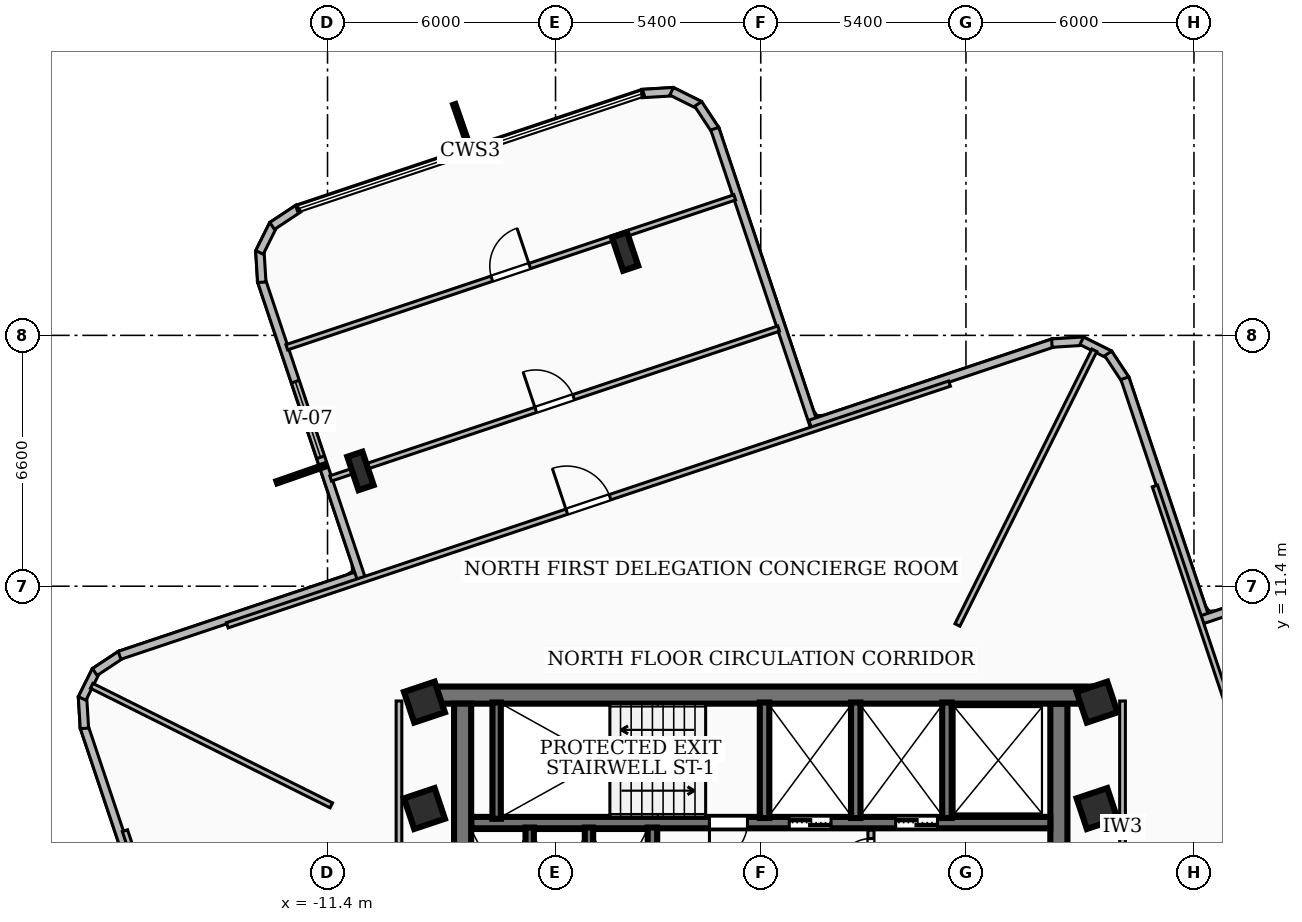
"""IFC4 building model, lengths in metres.
Left out: names, types, materials, properties, quantities, classifications, styles, units other than length and angle.
Written with IfcOpenShell. Run it as: python <this file> out.ifc"""

import sys

from ifc_helpers import new_model, si_unit, direction, frame, frame_2d, origin, origin_2d, place, context, subcontext, project, spatial, rectangle, i_section, extrude, element, fill, save


model = new_model("IFC4")
c1 = context("Model", 3, precision=1e-05, world=origin(), true_north=direction((0.0, 1.0)))
c2 = subcontext(c1, "Body", "Model", "MODEL_VIEW")
j1 = project(units=[si_unit("LENGTHUNIT", "METRE"), si_unit("PLANEANGLEUNIT", "RADIAN")], contexts=[c1])
p1 = place(None, origin())
s1 = spatial("IfcSite", under=j1, at=p1, CompositionType="ELEMENT")
p2 = place(p1, origin())
s2 = spatial("IfcBuilding", under=s1, at=p2, CompositionType="ELEMENT")
p3 = place(p2, frame((0.0, 0.0, 163.08)))
s3 = spatial("IfcBuildingStorey", under=s2, at=p3, CompositionType="ELEMENT", Elevation=163.08)
p4 = place(p3, frame((-8.78, 8.535, 0.0), z_axis=(0.0, 0.0, 1.0), x_axis=(1.0, 0.0, 0.0)))
e1 = element("IfcWall", 1, at=p4, inside=s3, PredefinedType="SHEAR", context=c2, shape_type="SweptSolid", body=[
    extrude(rectangle(XDim=17.56, YDim=0.45, at=frame_2d((8.78, 0.0))), origin(), (0.0, 0.0, 1.0), 3.34),
])
for number, where, z_axis, x_axis in (
    (2, (-7.845, 1.975, 0.0), (0.0, 0.0, 1.0), (0.0, 1.0, 0.0)),
    (3, (7.845, 8.31, 0.0), (0.0, 0.0, 1.0), (0.0, -1.0, 0.0)),
):
    element("IfcWall", number, at=place(p3, frame(where, z_axis=z_axis, x_axis=x_axis)), inside=s3, PredefinedType="SHEAR", context=c2, shape_type="SweptSolid", body=[
        extrude(rectangle(XDim=6.335, YDim=0.45, at=frame_2d((3.167, 0.0))), origin(), (0.0, 0.0, 1.0), 3.34),
    ])
p5 = place(p3, frame((7.62, 5.18, 0.0), z_axis=(0.0, 0.0, 1.0), x_axis=(-1.0, 0.0, 0.0)))
e4 = element("IfcWall", 4, at=p5, inside=s3, PredefinedType="SOLIDWALL", context=c2, shape_type="SweptSolid", body=[
    extrude(rectangle(XDim=15.24, YDim=0.3, at=frame_2d((7.62, 0.0))), origin(), (0.0, 0.0, 1.0), 3.34),
])
p6 = place(p5, frame((5.77, 0.0, 0.0)))
e5 = element("IfcOpeningElement", 5, at=p6, cuts=e4, PredefinedType="OPENING", context=c2, shape_type="SweptSolid", body=[
    extrude(rectangle(XDim=1.1, YDim=2.15, at=frame_2d((0.55, 1.075))), frame((0.0, 0.16, 0.0), z_axis=(0.0, -1.0, 0.0), x_axis=(1.0, 0.0, 0.0)), (0.0, 0.0, 1.0), 0.32),
])
p7 = place(p5, frame((2.97, 0.0, 0.0)))
e6 = element("IfcOpeningElement", 6, at=p7, cuts=e4, PredefinedType="OPENING", context=c2, shape_type="SweptSolid", body=[
    extrude(rectangle(XDim=1.1, YDim=2.15, at=frame_2d((0.55, 1.075))), frame((0.0, 0.16, 0.0), z_axis=(0.0, -1.0, 0.0), x_axis=(1.0, 0.0, 0.0)), (0.0, 0.0, 1.0), 0.32),
])
p8 = place(p5, frame((7.97, 0.0, 0.0)))
e7 = element("IfcOpeningElement", 7, at=p8, cuts=e4, PredefinedType="OPENING", context=c2, shape_type="SweptSolid", body=[
    extrude(rectangle(XDim=1.0, YDim=2.1, at=frame_2d((0.5, 1.05))), frame((0.0, 0.16, 0.0), z_axis=(0.0, -1.0, 0.0), x_axis=(1.0, 0.0, 0.0)), (0.0, 0.0, 1.0), 0.32),
])
p9 = place(p3, frame((-6.95, 5.28, 0.0), z_axis=(0.0, 0.0, 1.0), x_axis=(0.0, 1.0, 0.0)))
e8 = element("IfcWall", 8, at=p9, inside=s3, PredefinedType="SOLIDWALL", context=c2, shape_type="SweptSolid", body=[
    extrude(rectangle(XDim=3.06, YDim=0.22, at=frame_2d((1.53, 0.0))), origin(), (0.0, 0.0, 1.0), 3.34),
])
for number, where, z_axis, x_axis in (
    (9, (0.1, 5.3, 0.0), (0.0, 0.0, 1.0), (0.0, 1.0, 0.0)),
    (10, (2.5, 5.3, 0.0), (0.0, 0.0, 1.0), (0.0, 1.0, 0.0)),
    (11, (4.9, 5.3, 0.0), (0.0, 0.0, 1.0), (0.0, 1.0, 0.0)),
):
    element("IfcWall", number, at=place(p3, frame(where, z_axis=z_axis, x_axis=x_axis)), inside=s3, PredefinedType="SOLIDWALL", context=c2, shape_type="SweptSolid", body=[
        extrude(rectangle(XDim=3.04, YDim=0.25, at=frame_2d((1.52, 0.0))), origin(), (0.0, 0.0, 1.0), 3.34),
    ])
p10 = place(p3, frame((-2.85, 1.98, 0.0), z_axis=(0.0, 0.0, 1.0), x_axis=(0.0, 1.0, 0.0)))
e12 = element("IfcWall", 12, at=p10, inside=s3, PredefinedType="SOLIDWALL", context=c2, shape_type="SweptSolid", body=[
    extrude(rectangle(XDim=3.07, YDim=0.25, at=frame_2d((1.535, 0.0))), origin(), (0.0, 0.0, 1.0), 3.34),
])
for number, where, z_axis, x_axis in (
    (13, (-6.08, 1.98, 0.0), (0.0, 0.0, 1.0), (0.0, 1.0, 0.0)),
    (14, (-4.52, 1.98, 0.0), (0.0, 0.0, 1.0), (0.0, 1.0, 0.0)),
):
    element("IfcWall", number, at=place(p3, frame(where, z_axis=z_axis, x_axis=x_axis)), inside=s3, PredefinedType="SOLIDWALL", context=c2, shape_type="SweptSolid", body=[
        extrude(rectangle(XDim=3.07, YDim=0.22, at=frame_2d((1.535, 0.0))), origin(), (0.0, 0.0, 1.0), 3.34),
    ])
for number, where, z_axis, x_axis in (
    (15, (-8.85, 5.55, 0.0), (0.0, 0.0, 1.0), (0.948, 0.317, 0.0)),
    (16, (8.85, 5.55, 0.0), (0.0, 0.0, 1.0), (0.948, 0.317, 0.0)),
    (17, (-8.85, 8.35, 0.0), (0.0, 0.0, 1.0), (0.948, 0.317, 0.0)),
    (18, (8.85, 8.35, 0.0), (0.0, 0.0, 1.0), (0.948, 0.317, 0.0)),
):
    element("IfcColumn", number, at=place(p3, frame(where, z_axis=z_axis, x_axis=x_axis)), inside=s3, PredefinedType="COLUMN", context=c2, shape_type="SweptSolid", body=[
        extrude(rectangle(XDim=0.85, YDim=0.85, at=origin_2d()), origin(), (0.0, 0.0, 1.0), 3.6),
    ])
for number, where, z_axis, x_axis in (
    (19, (-3.57, 20.207, 0.0), (0.0, 0.0, 1.0), (0.948, 0.317, 0.0)),
    (20, (-10.533, 14.433, 0.0), (0.0, 0.0, 1.0), (0.948, 0.317, 0.0)),
):
    element("IfcColumn", number, at=place(p3, frame(where, z_axis=z_axis, x_axis=x_axis)), inside=s3, PredefinedType="COLUMN", context=c2, shape_type="SweptSolid", body=[
        extrude(i_section(OverallWidth=0.418, OverallDepth=0.927, WebThickness=0.019, FlangeThickness=0.032, at=origin_2d()), origin(), (0.0, 0.0, 1.0), 3.6),
    ])
p11 = place(p3, frame((-15.662, 1.3, 0.0), z_axis=(0.0, 0.0, 1.0), x_axis=(-0.317224676093, 0.948350412494, 0.0)))
e21 = element("IfcWall", 21, at=p11, inside=s3, PredefinedType="SOLIDWALL", context=c2, shape_type="SweptSolid", body=[
    extrude(rectangle(XDim=6.758, YDim=0.22, at=frame_2d((3.379, 0.0))), origin(), (0.0, 0.0, 1.0), 3.34),
])
p12 = place(p3, frame((-17.796, 7.66, 0.0), z_axis=(0.0, 0.0, 1.0), x_axis=(-0.062305442082, 0.998057128569, 0.0)))
e22 = element("IfcWall", 22, at=p12, inside=s3, PredefinedType="SOLIDWALL", context=c2, shape_type="SweptSolid", body=[
    extrude(rectangle(XDim=0.835, YDim=0.22, at=frame_2d((0.417, 0.0))), origin(), (0.0, 0.0, 1.0), 3.34),
])
p13 = place(p3, frame((-17.857, 8.446, 0.0), z_axis=(0.0, 0.0, 1.0), x_axis=(0.446258139106, 0.894904281631, 0.0)))
e23 = element("IfcWall", 23, at=p13, inside=s3, PredefinedType="SOLIDWALL", context=c2, shape_type="SweptSolid", body=[
    extrude(rectangle(XDim=0.818, YDim=0.22, at=frame_2d((0.409, 0.0))), origin(), (0.0, 0.0, 1.0), 3.34),
])
p14 = place(p3, frame((-17.524, 9.142, 0.0), z_axis=(0.0, 0.0, 1.0), x_axis=(0.833756011094, 0.552133058206, 0.0)))
e24 = element("IfcWall", 24, at=p14, inside=s3, PredefinedType="SOLIDWALL", context=c2, shape_type="SweptSolid", body=[
    extrude(rectangle(XDim=0.835, YDim=0.22, at=frame_2d((0.417, 0.0))), origin(), (0.0, 0.0, 1.0), 3.34),
])
p15 = place(p3, frame((-16.873, 9.581, 0.0), z_axis=(0.0, 0.0, 1.0), x_axis=(0.94829606055, 0.317387116224, 0.0)))
e25 = element("IfcWall", 25, at=p15, inside=s3, PredefinedType="SOLIDWALL", context=c2, shape_type="SweptSolid", body=[
    extrude(rectangle(XDim=6.758, YDim=0.22, at=frame_2d((3.379, 0.0))), origin(), (0.0, 0.0, 1.0), 3.34),
])
p16 = place(p3, frame((-10.519, 11.615, 0.0), z_axis=(0.0, 0.0, 1.0), x_axis=(-0.317229741122, 0.948348718219, 0.0)))
e26 = element("IfcWall", 26, at=p16, inside=s3, PredefinedType="SOLIDWALL", context=c2, shape_type="SweptSolid", body=[
    extrude(rectangle(XDim=8.259, YDim=0.22, at=frame_2d((4.129, 0.0))), origin(), (0.0, 0.0, 1.0), 3.34),
])
p17 = place(p16, frame((3.35, 0.0, 0.85)))
e27 = element("IfcOpeningElement", 27, at=p17, cuts=e26, PredefinedType="OPENING", context=c2, shape_type="SweptSolid", body=[
    extrude(rectangle(XDim=2.1, YDim=1.8, at=frame_2d((1.05, 0.9))), frame((0.0, 0.12, 0.0), z_axis=(0.0, -1.0, 0.0), x_axis=(1.0, 0.0, 0.0)), (0.0, 0.0, 1.0), 0.24),
])
p18 = place(p3, frame((-13.129, 19.398, 0.0), z_axis=(0.0, 0.0, 1.0), x_axis=(-0.062378286155, 0.998052578483, 0.0)))
e28 = element("IfcWall", 28, at=p18, inside=s3, PredefinedType="SOLIDWALL", context=c2, shape_type="SweptSolid", body=[
    extrude(rectangle(XDim=0.834, YDim=0.22, at=frame_2d((0.417, 0.0))), origin(), (0.0, 0.0, 1.0), 3.34),
])
p19 = place(p3, frame((-13.19, 20.183, 0.0), z_axis=(0.0, 0.0, 1.0), x_axis=(0.445781750405, 0.895141682085, 0.0)))
e29 = element("IfcWall", 29, at=p19, inside=s3, PredefinedType="SOLIDWALL", context=c2, shape_type="SweptSolid", body=[
    extrude(rectangle(XDim=0.819, YDim=0.22, at=frame_2d((0.409, 0.0))), origin(), (0.0, 0.0, 1.0), 3.34),
])
p20 = place(p3, frame((-12.857, 20.88, 0.0), z_axis=(0.0, 0.0, 1.0), x_axis=(0.833621383437, 0.552336300706, 0.0)))
e30 = element("IfcWall", 30, at=p20, inside=s3, PredefinedType="SOLIDWALL", context=c2, shape_type="SweptSolid", body=[
    extrude(rectangle(XDim=0.835, YDim=0.22, at=frame_2d((0.417, 0.0))), origin(), (0.0, 0.0, 1.0), 3.34),
])
p21 = place(p3, frame((-3.131, 24.363, 0.0), z_axis=(0.0, 0.0, 1.0), x_axis=(0.998269325078, 0.05880777677, 0.0)))
e31 = element("IfcWall", 31, at=p21, inside=s3, PredefinedType="SOLIDWALL", context=c2, shape_type="SweptSolid", body=[
    extrude(rectangle(XDim=0.834, YDim=0.22, at=frame_2d((0.417, 0.0))), origin(), (0.0, 0.0, 1.0), 3.34),
])
p22 = place(p3, frame((-2.345, 24.422, 0.0), z_axis=(0.0, 0.0, 1.0), x_axis=(0.895022680219, -0.446020629449, 0.0)))
e32 = element("IfcWall", 32, at=p22, inside=s3, PredefinedType="SOLIDWALL", context=c2, shape_type="SweptSolid", body=[
    extrude(rectangle(XDim=0.819, YDim=0.22, at=frame_2d((0.409, 0.0))), origin(), (0.0, 0.0, 1.0), 3.34),
])
p23 = place(p3, frame((-1.648, 24.089, 0.0), z_axis=(0.0, 0.0, 1.0), x_axis=(0.551319103184, -0.834294460286, 0.0)))
e33 = element("IfcWall", 33, at=p23, inside=s3, PredefinedType="SOLIDWALL", context=c2, shape_type="SweptSolid", body=[
    extrude(rectangle(XDim=0.834, YDim=0.22, at=frame_2d((0.417, 0.0))), origin(), (0.0, 0.0, 1.0), 3.34),
])
p24 = place(p3, frame((-1.21, 23.438, 0.0), z_axis=(0.0, 0.0, 1.0), x_axis=(0.317371670522, -0.948301229963, 0.0)))
e34 = element("IfcWall", 34, at=p24, inside=s3, PredefinedType="SOLIDWALL", context=c2, shape_type="SweptSolid", body=[
    extrude(rectangle(XDim=8.258, YDim=0.22, at=frame_2d((4.129, 0.0))), origin(), (0.0, 0.0, 1.0), 2.644),
])
p25 = place(p3, frame((1.3, 15.662, 0.0), z_axis=(0.0, 0.0, 1.0), x_axis=(0.948350412494, 0.317224676093, 0.0)))
e35 = element("IfcWall", 35, at=p25, inside=s3, PredefinedType="SOLIDWALL", context=c2, shape_type="SweptSolid", body=[
    extrude(rectangle(XDim=6.758, YDim=0.22, at=frame_2d((3.379, 0.0))), origin(), (0.0, 0.0, 1.0), 2.644),
])
p26 = place(p3, frame((7.66, 17.796, 0.0), z_axis=(0.0, 0.0, 1.0), x_axis=(0.998057128569, 0.062305442082, 0.0)))
e36 = element("IfcWall", 36, at=p26, inside=s3, PredefinedType="SOLIDWALL", context=c2, shape_type="SweptSolid", body=[
    extrude(rectangle(XDim=0.835, YDim=0.22, at=frame_2d((0.417, 0.0))), origin(), (0.0, 0.0, 1.0), 3.34),
])
p27 = place(p3, frame((8.446, 17.857, 0.0), z_axis=(0.0, 0.0, 1.0), x_axis=(0.894904281631, -0.446258139106, 0.0)))
e37 = element("IfcWall", 37, at=p27, inside=s3, PredefinedType="SOLIDWALL", context=c2, shape_type="SweptSolid", body=[
    extrude(rectangle(XDim=0.818, YDim=0.22, at=frame_2d((0.409, 0.0))), origin(), (0.0, 0.0, 1.0), 3.34),
])
p28 = place(p3, frame((9.142, 17.524, 0.0), z_axis=(0.0, 0.0, 1.0), x_axis=(0.552133058206, -0.833756011094, 0.0)))
e38 = element("IfcWall", 38, at=p28, inside=s3, PredefinedType="SOLIDWALL", context=c2, shape_type="SweptSolid", body=[
    extrude(rectangle(XDim=0.835, YDim=0.22, at=frame_2d((0.417, 0.0))), origin(), (0.0, 0.0, 1.0), 3.34),
])
p29 = place(p3, frame((9.581, 16.873, 0.0), z_axis=(0.0, 0.0, 1.0), x_axis=(0.317387116224, -0.94829606055, 0.0)))
e39 = element("IfcWall", 39, at=p29, inside=s3, PredefinedType="SOLIDWALL", context=c2, shape_type="SweptSolid", body=[
    extrude(rectangle(XDim=6.758, YDim=0.22, at=frame_2d((3.379, 0.0))), origin(), (0.0, 0.0, 1.0), 2.644),
])
p30 = place(p3, frame((11.615, 10.519, 0.0), z_axis=(0.0, 0.0, 1.0), x_axis=(0.948331055834, 0.317282537404, 0.0)))
e40 = element("IfcWall", 40, at=p30, inside=s3, PredefinedType="SOLIDWALL", context=c2, shape_type="SweptSolid", body=[
    extrude(rectangle(XDim=9.858, YDim=0.22, at=frame_2d((4.929, 0.0))), origin(), (0.0, 0.0, 1.0), 2.644),
])
p31 = place(p3, frame((2.9, 2.04, 0.0), z_axis=(0.0, 0.0, 1.0), x_axis=(0.0, 1.0, 0.0)))
e41 = element("IfcWall", 41, at=p31, inside=s3, PredefinedType="PARTITIONING", context=c2, shape_type="SweptSolid", body=[
    extrude(rectangle(XDim=2.94, YDim=0.16, at=frame_2d((1.47, 0.0))), origin(), (0.0, 0.0, 1.0), 2.57),
])
p32 = place(p31, frame((1.82, 0.0, 0.0)))
e42 = element("IfcOpeningElement", 42, at=p32, cuts=e41, PredefinedType="OPENING", context=c2, shape_type="SweptSolid", body=[
    extrude(rectangle(XDim=0.9, YDim=2.06, at=frame_2d((0.45, 1.03))), frame((0.0, 0.09, 0.0), z_axis=(0.0, -1.0, 0.0), x_axis=(1.0, 0.0, 0.0)), (0.0, 0.0, 1.0), 0.18),
])
p33 = place(p3, frame((-9.52, 1.75, 0.0), z_axis=(0.0, 0.0, 1.0), x_axis=(0.0, 1.0, 0.0)))
e43 = element("IfcWall", 43, at=p33, inside=s3, PredefinedType="PARTITIONING", context=c2, shape_type="SweptSolid", body=[
    extrude(rectangle(XDim=6.63, YDim=0.15, at=frame_2d((3.315, 0.0))), origin(), (0.0, 0.0, 1.0), 3.34),
])
p34 = place(p3, frame((9.52, 1.75, 0.0), z_axis=(0.0, 0.0, 1.0), x_axis=(0.0, 1.0, 0.0)))
e44 = element("IfcWall", 44, at=p34, inside=s3, PredefinedType="PARTITIONING", context=c2, shape_type="SweptSolid", body=[
    extrude(rectangle(XDim=6.63, YDim=0.15, at=frame_2d((3.315, 0.0))), origin(), (0.0, 0.0, 1.0), 2.644),
])
p35 = place(p3, frame((5.176, 10.38, 0.0), z_axis=(0.0, 0.0, 1.0), x_axis=(0.446173290391, 0.894946587759, 0.0)))
e45 = element("IfcWall", 45, at=p35, inside=s3, PredefinedType="PARTITIONING", context=c2, shape_type="SweptSolid", body=[
    extrude(rectangle(XDim=8.075, YDim=0.145, at=frame_2d((4.038, 0.0))), origin(), (0.0, 0.0, 1.0), 2.644),
])
p36 = place(p3, frame((-11.3, 5.634, 0.0), z_axis=(0.0, 0.0, 1.0), x_axis=(-0.894904738475, 0.446257222972, 0.0)))
e46 = element("IfcWall", 46, at=p36, inside=s3, PredefinedType="PARTITIONING", context=c2, shape_type="SweptSolid", body=[
    extrude(rectangle(XDim=7.048, YDim=0.145, at=frame_2d((3.524, 0.0))), origin(), (0.0, 0.0, 1.0), 3.34),
])
p37 = place(p3, frame((10.372, 14.037, 0.0), z_axis=(0.0, 0.0, 1.0), x_axis=(0.317298382655, -0.94832575435, 0.0)))
e47 = element("IfcWall", 47, at=p37, inside=s3, PredefinedType="PARTITIONING", context=c2, shape_type="SweptSolid", body=[
    extrude(rectangle(XDim=20.041, YDim=0.145, at=frame_2d((10.021, 0.0))), origin(), (0.0, 0.0, 1.0), 2.644),
])
p38 = place(p37, frame((9.42, 0.0, 0.0)))
e48 = element("IfcOpeningElement", 48, at=p38, cuts=e47, PredefinedType="OPENING", context=c2, shape_type="SweptSolid", body=[
    extrude(rectangle(XDim=1.2, YDim=2.1, at=frame_2d((0.6, 1.05))), frame((0.0, 0.083, 0.0), z_axis=(0.0, -1.0, 0.0), x_axis=(1.0, 0.0, 0.0)), (0.0, 0.0, 1.0), 0.165),
])
p39 = place(p3, frame((-14.037, 10.372, 0.0), z_axis=(0.0, 0.0, 1.0), x_axis=(0.94832575435, 0.317298382655, 0.0)))
e49 = element("IfcWall", 49, at=p39, inside=s3, PredefinedType="PARTITIONING", context=c2, shape_type="SweptSolid", body=[
    extrude(rectangle(XDim=20.041, YDim=0.145, at=frame_2d((10.021, 0.0))), origin(), (0.0, 0.0, 1.0), 2.644),
])
p40 = place(p39, frame((9.42, 0.0, 0.0)))
e50 = element("IfcOpeningElement", 50, at=p40, cuts=e49, PredefinedType="OPENING", context=c2, shape_type="SweptSolid", body=[
    extrude(rectangle(XDim=1.2, YDim=2.1, at=frame_2d((0.6, 1.05))), frame((0.0, 0.083, 0.0), z_axis=(0.0, -1.0, 0.0), x_axis=(1.0, 0.0, 0.0)), (0.0, 0.0, 1.0), 0.165),
])
p41 = place(p3, frame((-11.317, 14.235, 0.0), z_axis=(0.0, 0.0, 1.0), x_axis=(0.948331136084, 0.317282297544, 0.0)))
e51 = element("IfcWall", 51, at=p41, inside=s3, PredefinedType="PARTITIONING", context=c2, shape_type="SweptSolid", body=[
    extrude(rectangle(XDim=12.43, YDim=0.145, at=frame_2d((6.215, 0.0))), origin(), (0.0, 0.0, 1.0), 2.644),
])
p42 = place(p41, frame((5.69, 0.0, 0.0)))
e52 = element("IfcOpeningElement", 52, at=p42, cuts=e51, PredefinedType="OPENING", context=c2, shape_type="SweptSolid", body=[
    extrude(rectangle(XDim=1.05, YDim=2.08, at=frame_2d((0.525, 1.04))), frame((0.0, 0.083, 0.0), z_axis=(0.0, -1.0, 0.0), x_axis=(1.0, 0.0, 0.0)), (0.0, 0.0, 1.0), 0.165),
])
p43 = place(p3, frame((-12.472, 17.687, 0.0), z_axis=(0.0, 0.0, 1.0), x_axis=(0.948325226172, 0.317299961245, 0.0)))
e53 = element("IfcWall", 53, at=p43, inside=s3, PredefinedType="PARTITIONING", context=c2, shape_type="SweptSolid", body=[
    extrude(rectangle(XDim=12.43, YDim=0.145, at=frame_2d((6.215, 0.0))), origin(), (0.0, 0.0, 1.0), 3.34),
])
p44 = place(p43, frame((5.69, 0.0, 0.0)))
e54 = element("IfcOpeningElement", 54, at=p44, cuts=e53, PredefinedType="OPENING", context=c2, shape_type="SweptSolid", body=[
    extrude(rectangle(XDim=1.05, YDim=2.08, at=frame_2d((0.525, 1.04))), frame((0.0, 0.083, 0.0), z_axis=(0.0, -1.0, 0.0), x_axis=(1.0, 0.0, 0.0)), (0.0, 0.0, 1.0), 0.165),
])
p45 = place(p3, frame((-10.372, -14.037, 0.0), z_axis=(0.0, 0.0, 1.0), x_axis=(-0.317298382655, 0.94832575435, 0.0)))
e55 = element("IfcWall", 55, at=p45, inside=s3, PredefinedType="PARTITIONING", context=c2, shape_type="SweptSolid", body=[
    extrude(rectangle(XDim=20.041, YDim=0.145, at=frame_2d((10.021, 0.0))), origin(), (0.0, 0.0, 1.0), 2.644),
])
p46 = place(p45, frame((9.42, 0.0, 0.0)))
e56 = element("IfcOpeningElement", 56, at=p46, cuts=e55, PredefinedType="OPENING", context=c2, shape_type="SweptSolid", body=[
    extrude(rectangle(XDim=1.2, YDim=2.1, at=frame_2d((0.6, 1.05))), frame((0.0, 0.083, 0.0), z_axis=(0.0, -1.0, 0.0), x_axis=(1.0, 0.0, 0.0)), (0.0, 0.0, 1.0), 0.165),
])
p47 = place(p17, origin())
e57 = element("IfcWindow", 57, at=p47, inside=s3, PartitioningType="SINGLE_PANEL", PredefinedType="WINDOW", context=c2, shape_type="SweptSolid", body=[
    extrude(rectangle(XDim=2.1, YDim=1.8, at=frame_2d((1.05, 0.9))), frame((0.0, 0.03, 0.0), z_axis=(0.0, -1.0, 0.0), x_axis=(1.0, 0.0, 0.0)), (0.0, 0.0, 1.0), 0.06),
])
fill(e27, e57)
p48 = place(p6, origin())
e58 = element("IfcDoor", 58, at=p48, inside=s3, OperationType="DOUBLE_DOOR_SLIDING", PredefinedType="DOOR", context=c2, shape_type="SweptSolid", body=[
    extrude(rectangle(XDim=1.1, YDim=2.15, at=frame_2d((0.55, 1.075))), frame((0.0, 0.025, 0.0), z_axis=(0.0, -1.0, 0.0), x_axis=(1.0, 0.0, 0.0)), (0.0, 0.0, 1.0), 0.05),
])
fill(e5, e58)
p49 = place(p7, origin())
e59 = element("IfcDoor", 59, at=p49, inside=s3, OperationType="DOUBLE_DOOR_SLIDING", PredefinedType="DOOR", context=c2, shape_type="SweptSolid", body=[
    extrude(rectangle(XDim=1.1, YDim=2.15, at=frame_2d((0.55, 1.075))), frame((0.0, 0.025, 0.0), z_axis=(0.0, -1.0, 0.0), x_axis=(1.0, 0.0, 0.0)), (0.0, 0.0, 1.0), 0.05),
])
fill(e6, e59)
p50 = place(p8, origin())
e60 = element("IfcDoor", 60, at=p50, inside=s3, OperationType="SINGLE_SWING_RIGHT", PredefinedType="DOOR", context=c2, shape_type="SweptSolid", body=[
    extrude(rectangle(XDim=1.0, YDim=2.1, at=frame_2d((0.5, 1.05))), frame((0.0, 0.025, 0.0), z_axis=(0.0, -1.0, 0.0), x_axis=(1.0, 0.0, 0.0)), (0.0, 0.0, 1.0), 0.05),
])
fill(e7, e60)
p51 = place(p32, origin())
e61 = element("IfcDoor", 61, at=p51, inside=s3, OperationType="SINGLE_SWING_LEFT", PredefinedType="DOOR", context=c2, shape_type="SweptSolid", body=[
    extrude(rectangle(XDim=0.9, YDim=2.06, at=frame_2d((0.45, 1.03))), frame((0.0, 0.025, 0.0), z_axis=(0.0, -1.0, 0.0), x_axis=(1.0, 0.0, 0.0)), (0.0, 0.0, 1.0), 0.05),
])
fill(e42, e61)
p52 = place(p40, origin())
e62 = element("IfcDoor", 62, at=p52, inside=s3, OperationType="SINGLE_SWING_LEFT", PredefinedType="DOOR", context=c2, shape_type="SweptSolid", body=[
    extrude(rectangle(XDim=1.2, YDim=2.1, at=frame_2d((0.6, 1.05))), frame((0.0, 0.025, 0.0), z_axis=(0.0, -1.0, 0.0), x_axis=(1.0, 0.0, 0.0)), (0.0, 0.0, 1.0), 0.05),
])
fill(e50, e62)
p53 = place(p42, origin())
e63 = element("IfcDoor", 63, at=p53, inside=s3, OperationType="SINGLE_SWING_LEFT", PredefinedType="DOOR", context=c2, shape_type="SweptSolid", body=[
    extrude(rectangle(XDim=1.05, YDim=2.08, at=frame_2d((0.525, 1.04))), frame((0.0, 0.025, 0.0), z_axis=(0.0, -1.0, 0.0), x_axis=(1.0, 0.0, 0.0)), (0.0, 0.0, 1.0), 0.05),
])
fill(e52, e63)
p54 = place(p44, origin())
e64 = element("IfcDoor", 64, at=p54, inside=s3, OperationType="SINGLE_SWING_RIGHT", PredefinedType="DOOR", context=c2, shape_type="SweptSolid", body=[
    extrude(rectangle(XDim=1.05, YDim=2.08, at=frame_2d((0.525, 1.04))), frame((0.0, 0.025, 0.0), z_axis=(0.0, -1.0, 0.0), x_axis=(1.0, 0.0, 0.0)), (0.0, 0.0, 1.0), 0.05),
])
fill(e54, e64)
save(model, sys.argv[1])
